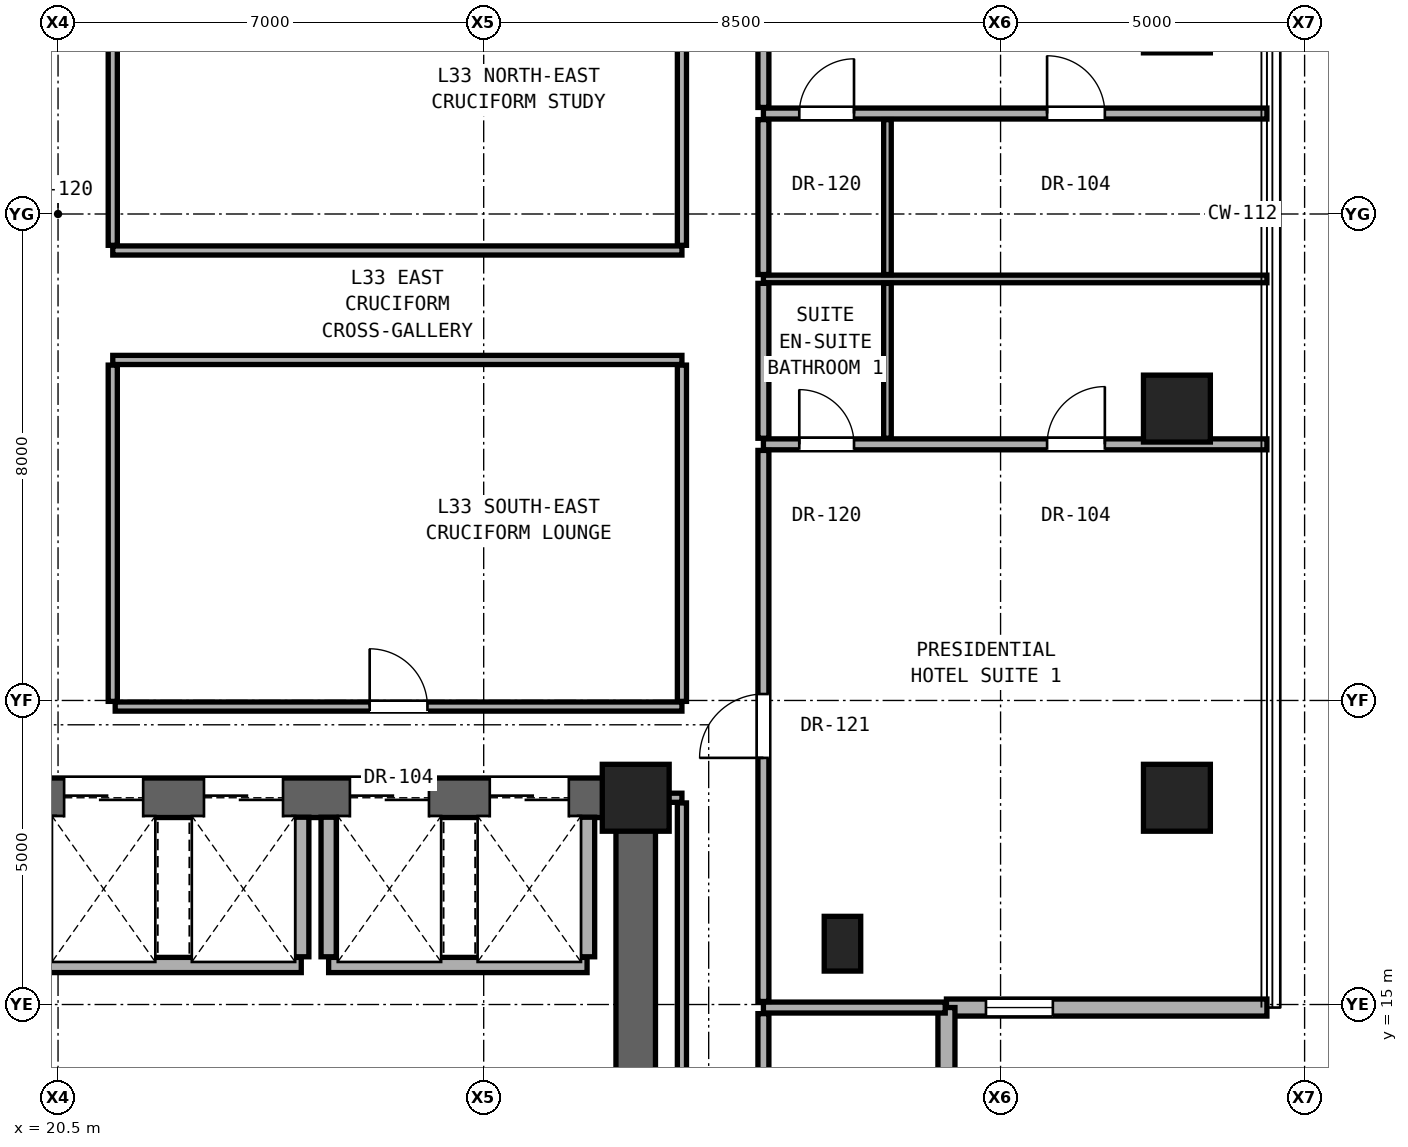
"""IFC4 building model, lengths in metres.
Left out: names, types, materials, properties, quantities, classifications, styles, units other than length and angle.
Written with IfcOpenShell. Run it as: python <this file> out.ifc"""

import sys

from ifc_helpers import new_model, si_unit, direction, frame, frame_2d, origin, origin_2d, place, context, subcontext, project, spatial, rectangle, hollow_rectangle, extrude, element, fill, save


model = new_model("IFC4")
c1 = context("Model", 3, precision=1e-05, world=origin(), true_north=direction((0.0, 1.0)))
c2 = subcontext(c1, "Body", "Model", "MODEL_VIEW")
j1 = project(units=[si_unit("LENGTHUNIT", "METRE"), si_unit("PLANEANGLEUNIT", "RADIAN")], contexts=[c1])
p1 = place(None, origin())
s1 = spatial("IfcSite", under=j1, at=p1, CompositionType="ELEMENT")
p2 = place(p1, origin())
s2 = spatial("IfcBuilding", under=s1, at=p2, CompositionType="ELEMENT")
p3 = place(p2, frame((0.0, 0.0, 118.1)))
s3 = spatial("IfcBuildingStorey", under=s2, at=p3, CompositionType="ELEMENT", Elevation=118.1)
p4 = place(p3, frame((30.0, 18.4, 0.0), z_axis=(0.0, 0.0, 1.0), x_axis=(1.0, 0.0, 0.0)))
e1 = element("IfcColumn", 1, at=p4, inside=s3, PredefinedType="COLUMN", context=c2, shape_type="SweptSolid", body=[
    extrude(rectangle(XDim=1.1, YDim=1.1, at=origin_2d()), origin(), (0.0, 0.0, 1.0), 3.3),
])
for number, where, z_axis, x_axis in (
    (2, (38.9, 18.4, 0.0), (0.0, 0.0, 1.0), (1.0, 0.0, 0.0)),
    (3, (38.9, 24.8, 0.0), (0.0, 0.0, 1.0), (1.0, 0.0, 0.0)),
    (4, (38.9, 31.2, 0.0), (0.0, 0.0, 1.0), (1.0, 0.0, 0.0)),
):
    element("IfcColumn", number, at=place(p3, frame(where, z_axis=z_axis, x_axis=x_axis)), inside=s3, PredefinedType="COLUMN", context=c2, shape_type="SweptSolid", body=[
        extrude(hollow_rectangle(XDim=1.1, YDim=1.1, WallThickness=0.06, at=origin_2d()), origin(), (0.0, 0.0, 1.0), 3.3),
    ])
p5 = place(p3, frame((33.4, 16.0, 0.0), z_axis=(0.0, 0.0, 1.0), x_axis=(1.0, 0.0, 0.0)))
e5 = element("IfcColumn", 5, at=p5, inside=s3, PredefinedType="PILASTER", context=c2, shape_type="SweptSolid", body=[
    extrude(rectangle(XDim=0.6, YDim=0.9, at=origin_2d()), origin(), (0.0, 0.0, 1.0), 3.3),
])
p6 = place(p3, frame((30.0, 12.4, 0.0), z_axis=(0.0, 0.0, 1.0), x_axis=(0.0, 1.0, 0.0)))
e6 = element("IfcWall", 6, at=p6, inside=s3, PredefinedType="SHEAR", context=c2, shape_type="SweptSolid", body=[
    extrude(rectangle(XDim=6.0, YDim=0.65, at=frame_2d((3.0, 0.0))), origin(), (0.0, 0.0, 1.0), 3.08),
])
p7 = place(p3, frame((11.0, 18.4, 0.0), z_axis=(0.0, 0.0, 1.0), x_axis=(1.0, 0.0, 0.0)))
e7 = element("IfcWall", 7, at=p7, inside=s3, PredefinedType="SHEAR", context=c2, shape_type="SweptSolid", body=[
    extrude(rectangle(XDim=19.0, YDim=0.65, at=frame_2d((9.5, 0.0))), origin(), (0.0, 0.0, 1.0), 3.08),
])
p8 = place(p7, frame((4.175, 0.0, 0.0)))
e8 = element("IfcOpeningElement", 8, at=p8, cuts=e7, PredefinedType="OPENING", context=c2, shape_type="SweptSolid", body=[
    extrude(rectangle(XDim=1.2, YDim=2.25, at=frame_2d((0.6, 1.125))), frame((0.0, 0.335, 0.0), z_axis=(0.0, -1.0, 0.0), x_axis=(1.0, 0.0, 0.0)), (0.0, 0.0, 1.0), 0.67),
])
p9 = place(p7, frame((9.6, 0.0, 0.0)))
e9 = element("IfcOpeningElement", 9, at=p9, cuts=e7, PredefinedType="OPENING", context=c2, shape_type="SweptSolid", body=[
    extrude(rectangle(XDim=1.3, YDim=2.3, at=frame_2d((0.65, 1.15))), frame((0.0, 0.335, 0.0), z_axis=(0.0, -1.0, 0.0), x_axis=(1.0, 0.0, 0.0)), (0.0, 0.0, 1.0), 0.67),
])
p10 = place(p7, frame((11.9, 0.0, 0.0)))
e10 = element("IfcOpeningElement", 10, at=p10, cuts=e7, PredefinedType="OPENING", context=c2, shape_type="SweptSolid", body=[
    extrude(rectangle(XDim=1.3, YDim=2.3, at=frame_2d((0.65, 1.15))), frame((0.0, 0.335, 0.0), z_axis=(0.0, -1.0, 0.0), x_axis=(1.0, 0.0, 0.0)), (0.0, 0.0, 1.0), 0.67),
])
p11 = place(p7, frame((14.3, 0.0, 0.0)))
e11 = element("IfcOpeningElement", 11, at=p11, cuts=e7, PredefinedType="OPENING", context=c2, shape_type="SweptSolid", body=[
    extrude(rectangle(XDim=1.3, YDim=2.3, at=frame_2d((0.65, 1.15))), frame((0.0, 0.335, 0.0), z_axis=(0.0, -1.0, 0.0), x_axis=(1.0, 0.0, 0.0)), (0.0, 0.0, 1.0), 0.67),
])
p12 = place(p7, frame((16.6, 0.0, 0.0)))
e12 = element("IfcOpeningElement", 12, at=p12, cuts=e7, PredefinedType="OPENING", context=c2, shape_type="SweptSolid", body=[
    extrude(rectangle(XDim=1.3, YDim=2.3, at=frame_2d((0.65, 1.15))), frame((0.0, 0.335, 0.0), z_axis=(0.0, -1.0, 0.0), x_axis=(1.0, 0.0, 0.0)), (0.0, 0.0, 1.0), 0.67),
])
p13 = place(p3, frame((35.11, 14.95, 0.0), z_axis=(0.0, 0.0, 1.0), x_axis=(1.0, 0.0, 0.0)))
e13 = element("IfcWall", 13, at=p13, inside=s3, PredefinedType="SOLIDWALL", context=c2, shape_type="SweptSolid", body=[
    extrude(rectangle(XDim=5.27, YDim=0.28, at=frame_2d((2.635, 0.0))), origin(), (0.0, 0.0, 1.0), 3.06),
])
p14 = place(p13, frame((0.65, 0.0, 0.85)))
e14 = element("IfcOpeningElement", 14, at=p14, cuts=e13, PredefinedType="OPENING", context=c2, shape_type="SweptSolid", body=[
    extrude(rectangle(XDim=1.1, YDim=2.0, at=frame_2d((0.55, 1.0))), frame((0.0, 0.15, 0.0), z_axis=(0.0, -1.0, 0.0), x_axis=(1.0, 0.0, 0.0)), (0.0, 0.0, 1.0), 0.3),
])
p15 = place(p3, frame((35.11, 9.68, 0.0), z_axis=(0.0, 0.0, 1.0), x_axis=(0.0, 1.0, 0.0)))
e15 = element("IfcWall", 15, at=p15, inside=s3, PredefinedType="SOLIDWALL", context=c2, shape_type="SweptSolid", body=[
    extrude(rectangle(XDim=5.27, YDim=0.28, at=frame_2d((2.635, 0.0))), origin(), (0.0, 0.0, 1.0), 3.06),
])
p16 = place(p3, frame((32.1, 14.95, 0.0), z_axis=(0.0, 0.0, 1.0), x_axis=(1.0, 0.0, 0.0)))
e16 = element("IfcWall", 16, at=p16, inside=s3, PredefinedType="PARTITIONING", context=c2, shape_type="SweptSolid", body=[
    extrude(rectangle(XDim=2.99, YDim=0.18, at=frame_2d((1.495, 0.0))), origin(), (0.0, 0.0, 1.0), 3.08),
])
p17 = place(p3, frame((20.35, 15.65, 0.0), z_axis=(0.0, 0.0, 1.0), x_axis=(1.0, 0.0, 0.0)))
e17 = element("IfcWall", 17, at=p17, inside=s3, PredefinedType="SOLIDWALL", context=c2, shape_type="SweptSolid", body=[
    extrude(rectangle(XDim=4.15, YDim=0.25, at=frame_2d((2.075, 0.0))), origin(), (0.0, 0.0, 1.0), 3.08),
])
p18 = place(p3, frame((24.95, 15.65, 0.0), z_axis=(0.0, 0.0, 1.0), x_axis=(1.0, 0.0, 0.0)))
e18 = element("IfcWall", 18, at=p18, inside=s3, PredefinedType="SOLIDWALL", context=c2, shape_type="SweptSolid", body=[
    extrude(rectangle(XDim=4.25, YDim=0.25, at=frame_2d((2.125, 0.0))), origin(), (0.0, 0.0, 1.0), 3.08),
])
p19 = place(p3, frame((30.32, 18.4, 0.0), z_axis=(0.0, 0.0, 1.0), x_axis=(1.0, 0.0, 0.0)))
e19 = element("IfcWall", 19, at=p19, inside=s3, PredefinedType="PARTITIONING", context=c2, shape_type="SweptSolid", body=[
    extrude(rectangle(XDim=0.44, YDim=0.15, at=frame_2d((0.22, 0.0))), origin(), (0.0, 0.0, 1.0), 2.456),
])
p20 = place(p3, frame((21.44, 19.9, 0.0), z_axis=(0.0, 0.0, 1.0), x_axis=(1.0, 0.0, 0.0)))
e20 = element("IfcWall", 20, at=p20, inside=s3, PredefinedType="PARTITIONING", context=c2, shape_type="SweptSolid", body=[
    extrude(rectangle(XDim=9.32, YDim=0.15, at=frame_2d((4.66, 0.0))), origin(), (0.0, 0.0, 1.0), 2.216),
])
p21 = place(p20, frame((4.185, 0.0, 0.0)))
e21 = element("IfcOpeningElement", 21, at=p21, cuts=e20, PredefinedType="OPENING", context=c2, shape_type="SweptSolid", body=[
    extrude(rectangle(XDim=0.95, YDim=2.15, at=frame_2d((0.475, 1.075))), frame((0.0, 0.085, 0.0), z_axis=(0.0, -1.0, 0.0), x_axis=(1.0, 0.0, 0.0)), (0.0, 0.0, 1.0), 0.17),
])
p22 = place(p3, frame((32.1, 24.212, 0.0), z_axis=(0.0, 0.0, 1.0), x_axis=(1.0, 0.0, 0.0)))
e22 = element("IfcWall", 22, at=p22, inside=s3, PredefinedType="PARTITIONING", context=c2, shape_type="SweptSolid", body=[
    extrude(rectangle(XDim=8.28, YDim=0.18, at=frame_2d((4.14, 0.0))), origin(), (0.0, 0.0, 1.0), 2.299),
])
p23 = place(p22, frame((4.665, 0.0, 0.0)))
e23 = element("IfcOpeningElement", 23, at=p23, cuts=e22, PredefinedType="OPENING", context=c2, shape_type="SweptSolid", body=[
    extrude(rectangle(XDim=0.95, YDim=2.15, at=frame_2d((0.475, 1.075))), frame((0.0, 0.1, 0.0), z_axis=(0.0, -1.0, 0.0), x_axis=(1.0, 0.0, 0.0)), (0.0, 0.0, 1.0), 0.2),
])
p24 = place(p22, frame((0.59, 0.0, 0.0)))
e24 = element("IfcOpeningElement", 24, at=p24, cuts=e22, PredefinedType="OPENING", context=c2, shape_type="SweptSolid", body=[
    extrude(rectangle(XDim=0.9, YDim=2.1, at=frame_2d((0.45, 1.05))), frame((0.0, 0.1, 0.0), z_axis=(0.0, -1.0, 0.0), x_axis=(1.0, 0.0, 0.0)), (0.0, 0.0, 1.0), 0.2),
])
p25 = place(p3, frame((21.4, 25.6, 0.0), z_axis=(0.0, 0.0, 1.0), x_axis=(1.0, 0.0, 0.0)))
e25 = element("IfcWall", 25, at=p25, inside=s3, PredefinedType="PARTITIONING", context=c2, shape_type="SweptSolid", body=[
    extrude(rectangle(XDim=9.36, YDim=0.15, at=frame_2d((4.68, 0.0))), origin(), (0.0, 0.0, 1.0), 2.216),
])
p26 = place(p3, frame((32.1, 26.932, 0.0), z_axis=(0.0, 0.0, 1.0), x_axis=(1.0, 0.0, 0.0)))
e26 = element("IfcWall", 26, at=p26, inside=s3, PredefinedType="PARTITIONING", context=c2, shape_type="SweptSolid", body=[
    extrude(rectangle(XDim=8.28, YDim=0.125, at=frame_2d((4.14, 0.0))), origin(), (0.0, 0.0, 1.0), 2.299),
])
p27 = place(p3, frame((21.4, 27.4, 0.0), z_axis=(0.0, 0.0, 1.0), x_axis=(1.0, 0.0, 0.0)))
e27 = element("IfcWall", 27, at=p27, inside=s3, PredefinedType="PARTITIONING", context=c2, shape_type="SweptSolid", body=[
    extrude(rectangle(XDim=9.36, YDim=0.15, at=frame_2d((4.68, 0.0))), origin(), (0.0, 0.0, 1.0), 2.216),
])
p28 = place(p3, frame((32.1, 29.652, 0.0), z_axis=(0.0, 0.0, 1.0), x_axis=(1.0, 0.0, 0.0)))
e28 = element("IfcWall", 28, at=p28, inside=s3, PredefinedType="PARTITIONING", context=c2, shape_type="SweptSolid", body=[
    extrude(rectangle(XDim=8.28, YDim=0.18, at=frame_2d((4.14, 0.0))), origin(), (0.0, 0.0, 1.0), 2.299),
])
p29 = place(p28, frame((4.665, 0.0, 0.0)))
e29 = element("IfcOpeningElement", 29, at=p29, cuts=e28, PredefinedType="OPENING", context=c2, shape_type="SweptSolid", body=[
    extrude(rectangle(XDim=0.95, YDim=2.15, at=frame_2d((0.475, 1.075))), frame((0.0, 0.1, 0.0), z_axis=(0.0, -1.0, 0.0), x_axis=(1.0, 0.0, 0.0)), (0.0, 0.0, 1.0), 0.2),
])
p30 = place(p28, frame((0.59, 0.0, 0.0)))
e30 = element("IfcOpeningElement", 30, at=p30, cuts=e28, PredefinedType="OPENING", context=c2, shape_type="SweptSolid", body=[
    extrude(rectangle(XDim=0.9, YDim=2.1, at=frame_2d((0.45, 1.05))), frame((0.0, 0.1, 0.0), z_axis=(0.0, -1.0, 0.0), x_axis=(1.0, 0.0, 0.0)), (0.0, 0.0, 1.0), 0.2),
])
p31 = place(p3, frame((20.315, 15.785, 0.0), z_axis=(0.0, 0.0, 1.0), x_axis=(0.0, 1.0, 0.0)))
e31 = element("IfcWall", 31, at=p31, inside=s3, PredefinedType="SOLIDWALL", context=c2, shape_type="SweptSolid", body=[
    extrude(rectangle(XDim=0.3, YDim=0.25, at=frame_2d((0.15, 0.0))), origin(), (0.0, 0.0, 1.0), 3.08),
])
p32 = place(p3, frame((20.315, 16.555, 0.0), z_axis=(0.0, 0.0, 1.0), x_axis=(0.0, 1.0, 0.0)))
e32 = element("IfcWall", 32, at=p32, inside=s3, PredefinedType="SOLIDWALL", context=c2, shape_type="SweptSolid", body=[
    extrude(rectangle(XDim=1.525, YDim=0.25, at=frame_2d((0.763, 0.0))), origin(), (0.0, 0.0, 1.0), 3.08),
])
for number, where, z_axis, x_axis in (
    (33, (21.4, 19.985, 0.0), (0.0, 0.0, 1.0), (0.0, 1.0, 0.0)),
    (34, (21.4, 27.485, 0.0), (0.0, 0.0, 1.0), (0.0, 1.0, 0.0)),
):
    element("IfcWall", number, at=place(p3, frame(where, z_axis=z_axis, x_axis=x_axis)), inside=s3, PredefinedType="PARTITIONING", context=c2, shape_type="SweptSolid", body=[
        extrude(rectangle(XDim=5.53, YDim=0.15, at=frame_2d((2.765, 0.0))), origin(), (0.0, 0.0, 1.0), 2.216),
    ])
for number, where, z_axis, x_axis in (
    (35, (24.5, 15.785, 0.0), (0.0, 0.0, 1.0), (0.0, 1.0, 0.0)),
    (36, (24.95, 15.785, 0.0), (0.0, 0.0, 1.0), (0.0, 1.0, 0.0)),
    (37, (29.2, 15.785, 0.0), (0.0, 0.0, 1.0), (0.0, 1.0, 0.0)),
):
    element("IfcWall", number, at=place(p3, frame(where, z_axis=z_axis, x_axis=x_axis)), inside=s3, PredefinedType="SOLIDWALL", context=c2, shape_type="SweptSolid", body=[
        extrude(rectangle(XDim=2.295, YDim=0.25, at=frame_2d((1.147, 0.0))), origin(), (0.0, 0.0, 1.0), 3.08),
    ])
p33 = place(p3, frame((30.76, 12.335, 0.0), z_axis=(0.0, 0.0, 1.0), x_axis=(0.0, 1.0, 0.0)))
e38 = element("IfcWall", 38, at=p33, inside=s3, PredefinedType="PARTITIONING", context=c2, shape_type="SweptSolid", body=[
    extrude(rectangle(XDim=5.98, YDim=0.15, at=frame_2d((2.99, 0.0))), origin(), (0.0, 0.0, 1.0), 2.456),
])
for number, where, z_axis, x_axis in (
    (39, (30.76, 19.985, 0.0), (0.0, 0.0, 1.0), (0.0, 1.0, 0.0)),
    (40, (30.76, 27.485, 0.0), (0.0, 0.0, 1.0), (0.0, 1.0, 0.0)),
):
    element("IfcWall", number, at=place(p3, frame(where, z_axis=z_axis, x_axis=x_axis)), inside=s3, PredefinedType="PARTITIONING", context=c2, shape_type="SweptSolid", body=[
        extrude(rectangle(XDim=5.53, YDim=0.15, at=frame_2d((2.765, 0.0))), origin(), (0.0, 0.0, 1.0), 2.299),
    ])
p34 = place(p3, frame((32.1, 9.68, 0.0), z_axis=(0.0, 0.0, 1.0), x_axis=(0.0, 1.0, 0.0)))
e41 = element("IfcWall", 41, at=p34, inside=s3, PredefinedType="PARTITIONING", context=c2, shape_type="SweptSolid", body=[
    extrude(rectangle(XDim=5.17, YDim=0.18, at=frame_2d((2.585, 0.0))), origin(), (0.0, 0.0, 1.0), 3.08),
])
p35 = place(p34, frame((2.11, 0.0, 0.0)))
e42 = element("IfcOpeningElement", 42, at=p35, cuts=e41, PredefinedType="OPENING", context=c2, shape_type="SweptSolid", body=[
    extrude(rectangle(XDim=0.95, YDim=2.15, at=frame_2d((0.475, 1.075))), frame((0.0, 0.1, 0.0), z_axis=(0.0, -1.0, 0.0), x_axis=(1.0, 0.0, 0.0)), (0.0, 0.0, 1.0), 0.2),
])
p36 = place(p3, frame((32.1, 15.05, 0.0), z_axis=(0.0, 0.0, 1.0), x_axis=(0.0, 1.0, 0.0)))
e43 = element("IfcWall", 43, at=p36, inside=s3, PredefinedType="PARTITIONING", context=c2, shape_type="SweptSolid", body=[
    extrude(rectangle(XDim=9.062, YDim=0.18, at=frame_2d((4.531, 0.0))), origin(), (0.0, 0.0, 1.0), 2.456),
])
p37 = place(p36, frame((4.006, 0.0, 0.0)))
e44 = element("IfcOpeningElement", 44, at=p37, cuts=e43, PredefinedType="OPENING", context=c2, shape_type="SweptSolid", body=[
    extrude(rectangle(XDim=1.05, YDim=2.2, at=frame_2d((0.525, 1.1))), frame((0.0, 0.1, 0.0), z_axis=(0.0, -1.0, 0.0), x_axis=(1.0, 0.0, 0.0)), (0.0, 0.0, 1.0), 0.2),
])
p38 = place(p3, frame((32.1, 24.312, 0.0), z_axis=(0.0, 0.0, 1.0), x_axis=(0.0, 1.0, 0.0)))
e45 = element("IfcWall", 45, at=p38, inside=s3, PredefinedType="PARTITIONING", context=c2, shape_type="SweptSolid", body=[
    extrude(rectangle(XDim=2.548, YDim=0.18, at=frame_2d((1.274, 0.0))), origin(), (0.0, 0.0, 1.0), 2.299),
])
p39 = place(p3, frame((32.1, 27.004, 0.0), z_axis=(0.0, 0.0, 1.0), x_axis=(0.0, 1.0, 0.0)))
e46 = element("IfcWall", 46, at=p39, inside=s3, PredefinedType="PARTITIONING", context=c2, shape_type="SweptSolid", body=[
    extrude(rectangle(XDim=2.548, YDim=0.18, at=frame_2d((1.274, 0.0))), origin(), (0.0, 0.0, 1.0), 3.08),
])
p40 = place(p3, frame((32.1, 29.752, 0.0), z_axis=(0.0, 0.0, 1.0), x_axis=(0.0, 1.0, 0.0)))
e47 = element("IfcWall", 47, at=p40, inside=s3, PredefinedType="PARTITIONING", context=c2, shape_type="SweptSolid", body=[
    extrude(rectangle(XDim=11.198, YDim=0.18, at=frame_2d((5.599, 0.0))), origin(), (0.0, 0.0, 1.0), 2.299),
])
p41 = place(p40, frame((5.074, 0.0, 0.0)))
e48 = element("IfcOpeningElement", 48, at=p41, cuts=e47, PredefinedType="OPENING", context=c2, shape_type="SweptSolid", body=[
    extrude(rectangle(XDim=1.05, YDim=2.2, at=frame_2d((0.525, 1.1))), frame((0.0, 0.1, 0.0), z_axis=(0.0, -1.0, 0.0), x_axis=(1.0, 0.0, 0.0)), (0.0, 0.0, 1.0), 0.2),
])
p42 = place(p3, frame((34.14, 24.312, 0.0), z_axis=(0.0, 0.0, 1.0), x_axis=(0.0, 1.0, 0.0)))
e49 = element("IfcWall", 49, at=p42, inside=s3, PredefinedType="PARTITIONING", context=c2, shape_type="SweptSolid", body=[
    extrude(rectangle(XDim=2.548, YDim=0.125, at=frame_2d((1.274, 0.0))), origin(), (0.0, 0.0, 1.0), 2.299),
])
p43 = place(p3, frame((34.14, 27.004, 0.0), z_axis=(0.0, 0.0, 1.0), x_axis=(0.0, 1.0, 0.0)))
e50 = element("IfcWall", 50, at=p43, inside=s3, PredefinedType="PARTITIONING", context=c2, shape_type="SweptSolid", body=[
    extrude(rectangle(XDim=2.548, YDim=0.125, at=frame_2d((1.274, 0.0))), origin(), (0.0, 0.0, 1.0), 3.08),
])
p44 = place(p14, origin())
e51 = element("IfcWindow", 51, at=p44, inside=s3, PartitioningType="SINGLE_PANEL", PredefinedType="WINDOW", context=c2, shape_type="SweptSolid", body=[
    extrude(rectangle(XDim=1.1, YDim=2.0, at=frame_2d((0.55, 1.0))), frame((0.0, 0.03, 0.0), z_axis=(0.0, -1.0, 0.0), x_axis=(1.0, 0.0, 0.0)), (0.0, 0.0, 1.0), 0.06),
])
fill(e14, e51)
p45 = place(p37, origin())
e52 = element("IfcDoor", 52, at=p45, inside=s3, OperationType="SINGLE_SWING_LEFT", PredefinedType="DOOR", context=c2, shape_type="SweptSolid", body=[
    extrude(rectangle(XDim=1.05, YDim=2.2, at=frame_2d((0.525, 1.1))), frame((0.0, 0.025, 0.0), z_axis=(0.0, -1.0, 0.0), x_axis=(1.0, 0.0, 0.0)), (0.0, 0.0, 1.0), 0.05),
])
fill(e44, e52)
p46 = place(p23, origin())
e53 = element("IfcDoor", 53, at=p46, inside=s3, OperationType="SINGLE_SWING_RIGHT", PredefinedType="DOOR", context=c2, shape_type="SweptSolid", body=[
    extrude(rectangle(XDim=0.95, YDim=2.15, at=frame_2d((0.475, 1.075))), frame((0.0, 0.025, 0.0), z_axis=(0.0, -1.0, 0.0), x_axis=(1.0, 0.0, 0.0)), (0.0, 0.0, 1.0), 0.05),
])
fill(e23, e53)
p47 = place(p24, origin())
e54 = element("IfcDoor", 54, at=p47, inside=s3, OperationType="SINGLE_SWING_LEFT", PredefinedType="DOOR", context=c2, shape_type="SweptSolid", body=[
    extrude(rectangle(XDim=0.9, YDim=2.1, at=frame_2d((0.45, 1.05))), frame((0.0, 0.025, 0.0), z_axis=(0.0, -1.0, 0.0), x_axis=(1.0, 0.0, 0.0)), (0.0, 0.0, 1.0), 0.05),
])
fill(e24, e54)
p48 = place(p29, origin())
e55 = element("IfcDoor", 55, at=p48, inside=s3, OperationType="SINGLE_SWING_LEFT", PredefinedType="DOOR", context=c2, shape_type="SweptSolid", body=[
    extrude(rectangle(XDim=0.95, YDim=2.15, at=frame_2d((0.475, 1.075))), frame((0.0, 0.025, 0.0), z_axis=(0.0, -1.0, 0.0), x_axis=(1.0, 0.0, 0.0)), (0.0, 0.0, 1.0), 0.05),
])
fill(e29, e55)
p49 = place(p30, origin())
e56 = element("IfcDoor", 56, at=p49, inside=s3, OperationType="SINGLE_SWING_RIGHT", PredefinedType="DOOR", context=c2, shape_type="SweptSolid", body=[
    extrude(rectangle(XDim=0.9, YDim=2.1, at=frame_2d((0.45, 1.05))), frame((0.0, 0.025, 0.0), z_axis=(0.0, -1.0, 0.0), x_axis=(1.0, 0.0, 0.0)), (0.0, 0.0, 1.0), 0.05),
])
fill(e30, e56)
p50 = place(p21, origin())
e57 = element("IfcDoor", 57, at=p50, inside=s3, OperationType="SINGLE_SWING_LEFT", PredefinedType="DOOR", context=c2, shape_type="SweptSolid", body=[
    extrude(rectangle(XDim=0.95, YDim=2.15, at=frame_2d((0.475, 1.075))), frame((0.0, 0.025, 0.0), z_axis=(0.0, -1.0, 0.0), x_axis=(1.0, 0.0, 0.0)), (0.0, 0.0, 1.0), 0.05),
])
fill(e21, e57)
p51 = place(p9, origin())
e58 = element("IfcDoor", 58, at=p51, inside=s3, OperationType="DOUBLE_DOOR_SLIDING", PredefinedType="DOOR", context=c2, shape_type="SweptSolid", body=[
    extrude(rectangle(XDim=1.3, YDim=2.3, at=frame_2d((0.65, 1.15))), frame((0.0, 0.025, 0.0), z_axis=(0.0, -1.0, 0.0), x_axis=(1.0, 0.0, 0.0)), (0.0, 0.0, 1.0), 0.05),
])
fill(e9, e58)
p52 = place(p10, origin())
e59 = element("IfcDoor", 59, at=p52, inside=s3, OperationType="DOUBLE_DOOR_SLIDING", PredefinedType="DOOR", context=c2, shape_type="SweptSolid", body=[
    extrude(rectangle(XDim=1.3, YDim=2.3, at=frame_2d((0.65, 1.15))), frame((0.0, 0.025, 0.0), z_axis=(0.0, -1.0, 0.0), x_axis=(1.0, 0.0, 0.0)), (0.0, 0.0, 1.0), 0.05),
])
fill(e10, e59)
p53 = place(p11, origin())
e60 = element("IfcDoor", 60, at=p53, inside=s3, OperationType="DOUBLE_DOOR_SLIDING", PredefinedType="DOOR", context=c2, shape_type="SweptSolid", body=[
    extrude(rectangle(XDim=1.3, YDim=2.3, at=frame_2d((0.65, 1.15))), frame((0.0, 0.025, 0.0), z_axis=(0.0, -1.0, 0.0), x_axis=(1.0, 0.0, 0.0)), (0.0, 0.0, 1.0), 0.05),
])
fill(e11, e60)
p54 = place(p12, origin())
e61 = element("IfcDoor", 61, at=p54, inside=s3, OperationType="DOUBLE_DOOR_SLIDING", PredefinedType="DOOR", context=c2, shape_type="SweptSolid", body=[
    extrude(rectangle(XDim=1.3, YDim=2.3, at=frame_2d((0.65, 1.15))), frame((0.0, 0.025, 0.0), z_axis=(0.0, -1.0, 0.0), x_axis=(1.0, 0.0, 0.0)), (0.0, 0.0, 1.0), 0.05),
])
fill(e12, e61)
save(model, sys.argv[1])
